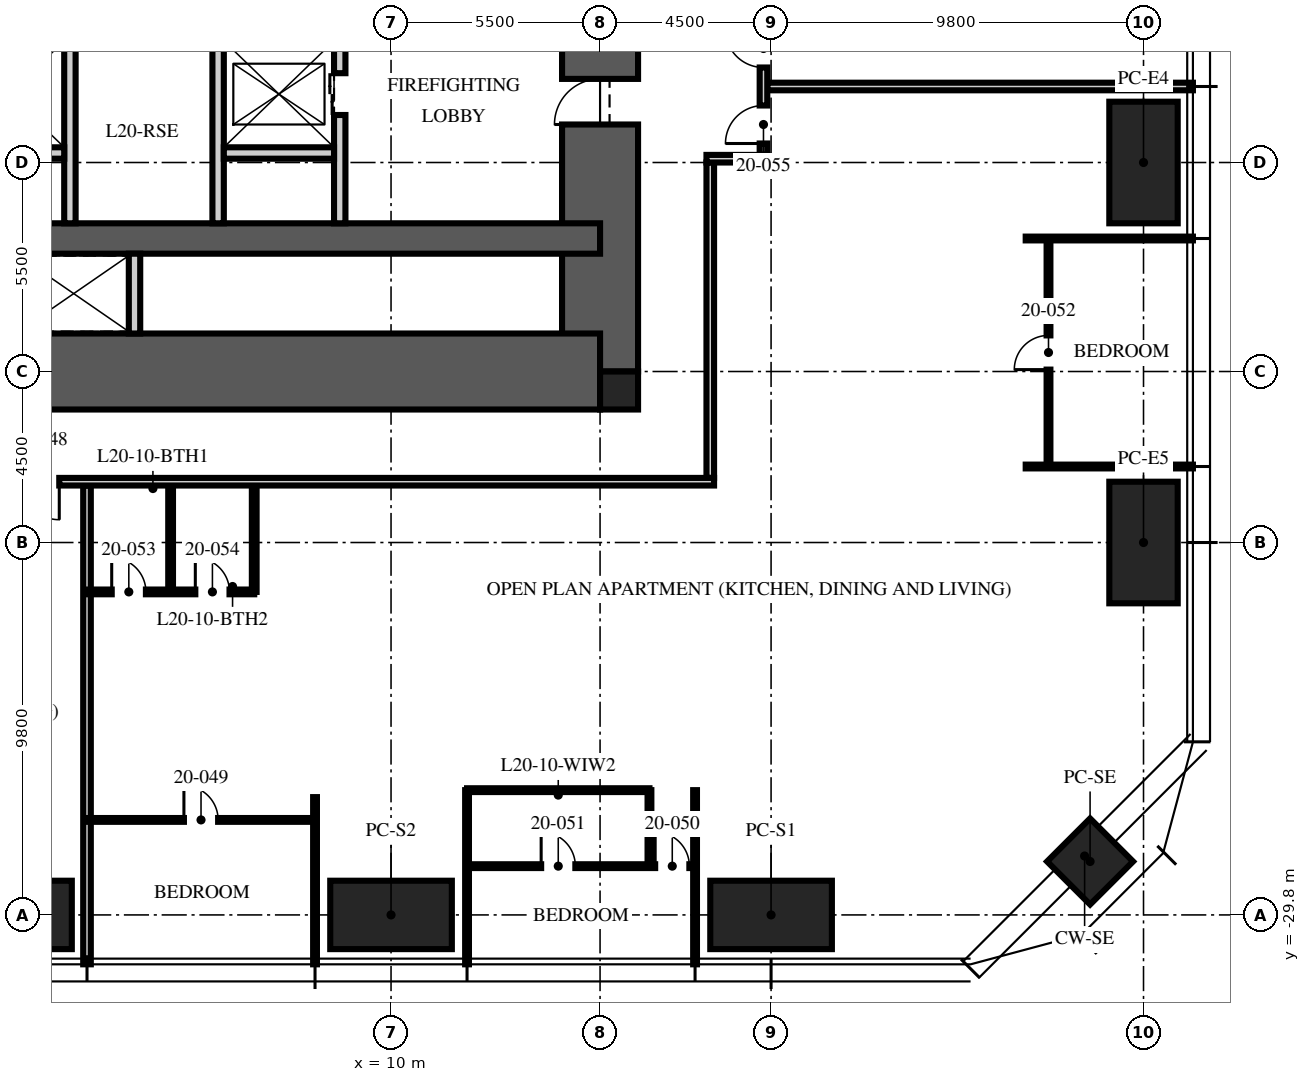
"""IFC4 building model, lengths in metres.
Left out: names, types, materials, properties, quantities, classifications, styles, units other than length and angle.
Written with IfcOpenShell. Run it as: python <this file> out.ifc"""

import sys

from ifc_helpers import new_model, si_unit, direction, frame, frame_2d, origin, origin_2d, place, context, subcontext, project, spatial, rectangle, hollow_rectangle, extrude, element, fill, save


model = new_model("IFC4")
c1 = context("Model", 3, precision=1e-05, world=origin(), true_north=direction((0.0, 1.0)))
c2 = subcontext(c1, "Body", "Model", "MODEL_VIEW")
j1 = project(units=[si_unit("LENGTHUNIT", "METRE"), si_unit("PLANEANGLEUNIT", "RADIAN")], contexts=[c1])
p1 = place(None, origin())
s1 = spatial("IfcSite", under=j1, at=p1, CompositionType="ELEMENT")
p2 = place(p1, origin())
s2 = spatial("IfcBuilding", under=s1, at=p2, CompositionType="ELEMENT")
p3 = place(p2, frame((0.0, 0.0, 81.0)))
s3 = spatial("IfcBuildingStorey", under=s2, at=p3, CompositionType="ELEMENT", Elevation=81.0)
p4 = place(p3, frame((15.5, -15.5, -0.25), z_axis=(0.0, 0.0, 1.0), x_axis=(0.0, 1.0, 0.0)))
e1 = element("IfcWall", 1, at=p4, inside=s3, PredefinedType="SHEAR", context=c2, shape_type="SweptSolid", body=[
    extrude(rectangle(XDim=31.0, YDim=2.0, at=frame_2d((15.5, 0.0))), origin(), (0.0, 0.0, 1.0), 3.75),
])
p5 = place(p4, frame((6.5, 0.0, 0.25)))
e2 = element("IfcOpeningElement", 2, at=p5, cuts=e1, PredefinedType="OPENING", context=c2, shape_type="SweptSolid", body=[
    extrude(rectangle(XDim=1.2, YDim=2.1, at=frame_2d((0.6, 1.05))), frame((0.0, 1.01, 0.0), z_axis=(0.0, -1.0, 0.0), x_axis=(1.0, 0.0, 0.0)), (0.0, 0.0, 1.0), 2.02),
])
p6 = place(p4, frame((23.0, 0.0, 0.25)))
e3 = element("IfcOpeningElement", 3, at=p6, cuts=e1, PredefinedType="OPENING", context=c2, shape_type="SweptSolid", body=[
    extrude(rectangle(XDim=1.8, YDim=2.1, at=frame_2d((0.9, 1.05))), frame((0.0, 1.01, 0.0), z_axis=(0.0, -1.0, 0.0), x_axis=(1.0, 0.0, 0.0)), (0.0, 0.0, 1.0), 2.02),
])
p7 = place(p3, frame((-15.5, -15.5, -0.25), z_axis=(0.0, 0.0, 1.0), x_axis=(1.0, 0.0, 0.0)))
e4 = element("IfcWall", 4, at=p7, inside=s3, PredefinedType="SHEAR", context=c2, shape_type="SweptSolid", body=[
    extrude(rectangle(XDim=31.0, YDim=2.0, at=frame_2d((15.5, 0.0))), origin(), (0.0, 0.0, 1.0), 3.75),
])
p8 = place(p3, frame((-15.5, -12.0, -0.25), z_axis=(0.0, 0.0, 1.0), x_axis=(1.0, 0.0, 0.0)))
e5 = element("IfcWall", 5, at=p8, inside=s3, PredefinedType="SHEAR", context=c2, shape_type="SweptSolid", body=[
    extrude(rectangle(XDim=31.0, YDim=0.8, at=frame_2d((15.5, 0.0))), origin(), (0.0, 0.0, 1.0), 3.75),
])
p9 = place(p3, frame((16.0, -16.0, -0.25), z_axis=(0.0, 0.0, 1.0), x_axis=(1.0, 0.0, 0.0)))
e6 = element("IfcColumn", 6, at=p9, inside=s3, PredefinedType="COLUMN", context=c2, shape_type="SweptSolid", body=[
    extrude(rectangle(XDim=1.0, YDim=1.0, at=origin_2d()), origin(), (0.0, 0.0, 1.0), 3.75),
])
for number, where, z_axis, x_axis in (
    (7, (29.8, -10.0, 0.0), (0.0, 0.0, 1.0), (0.0, 1.0, 0.0)),
    (8, (29.8, -20.0, 0.0), (0.0, 0.0, 1.0), (0.0, 1.0, 0.0)),
    (9, (20.0, -29.8, 0.0), (0.0, 0.0, 1.0), (1.0, 0.0, 0.0)),
    (10, (10.0, -29.8, 0.0), (0.0, 0.0, 1.0), (1.0, 0.0, 0.0)),
    (11, (0.0, -29.8, 0.0), (0.0, 0.0, 1.0), (1.0, 0.0, 0.0)),
):
    element("IfcColumn", number, at=place(p3, frame(where, z_axis=z_axis, x_axis=x_axis)), inside=s3, PredefinedType="COLUMN", context=c2, shape_type="SweptSolid", body=[
        extrude(hollow_rectangle(XDim=3.2, YDim=1.8, WallThickness=0.2, at=origin_2d()), origin(), (0.0, 0.0, 1.0), 3.75),
    ])
p10 = place(p3, frame((28.394, -28.394, 0.0), z_axis=(0.0, 0.0, 1.0), x_axis=(0.707106781187, 0.707106781187, 0.0)))
e12 = element("IfcColumn", 12, at=p10, inside=s3, PredefinedType="COLUMN", context=c2, shape_type="SweptSolid", body=[
    extrude(hollow_rectangle(XDim=1.6, YDim=1.6, WallThickness=0.1, at=origin_2d()), origin(), (0.0, 0.0, 1.0), 3.75),
])
p11 = place(p3, frame((8.65, -11.6, 0.0), z_axis=(0.0, 0.0, 1.0), x_axis=(0.0, 1.0, 0.0)))
e13 = element("IfcWall", 13, at=p11, inside=s3, PredefinedType="PARTITIONING", context=c2, shape_type="SweptSolid", body=[
    extrude(rectangle(XDim=6.7, YDim=0.3, at=frame_2d((3.35, 0.0))), origin(), (0.0, 0.0, 1.0), 3.5),
])
p12 = place(p11, frame((2.85, 0.0, 0.0)))
e14 = element("IfcOpeningElement", 14, at=p12, cuts=e13, PredefinedType="OPENING", context=c2, shape_type="SweptSolid", body=[
    extrude(rectangle(XDim=1.1, YDim=2.1, at=frame_2d((0.55, 1.05))), frame((0.0, 0.16, 0.0), z_axis=(0.0, -1.0, 0.0), x_axis=(1.0, 0.0, 0.0)), (0.0, 0.0, 1.0), 0.32),
])
for number, where, z_axis, x_axis in (
    (15, (1.55, -11.6, 0.0), (0.0, 0.0, 1.0), (0.0, 1.0, 0.0)),
    (16, (5.45, -11.6, 0.0), (0.0, 0.0, 1.0), (0.0, 1.0, 0.0)),
):
    element("IfcWall", number, at=place(p3, frame(where, z_axis=z_axis, x_axis=x_axis)), inside=s3, PredefinedType="PARTITIONING", context=c2, shape_type="SweptSolid", body=[
        extrude(rectangle(XDim=4.8, YDim=0.3, at=frame_2d((2.4, 0.0))), origin(), (0.0, 0.0, 1.0), 3.5),
    ])
for number, where, z_axis, x_axis in (
    (17, (-1.5, -9.75, 0.0), (0.0, 0.0, 1.0), (1.0, 0.0, 0.0)),
    (18, (5.6, -9.75, 0.0), (0.0, 0.0, 1.0), (1.0, 0.0, 0.0)),
):
    element("IfcWall", number, at=place(p3, frame(where, z_axis=z_axis, x_axis=x_axis)), inside=s3, PredefinedType="PARTITIONING", context=c2, shape_type="SweptSolid", body=[
        extrude(rectangle(XDim=2.9, YDim=0.3, at=frame_2d((1.45, 0.0))), origin(), (0.0, 0.0, 1.0), 3.5),
    ])
p13 = place(p3, frame((3.25, -14.5, 0.0), z_axis=(0.0, 0.0, 1.0), x_axis=(0.0, 1.0, 0.0)))
e19 = element("IfcWall", 19, at=p13, inside=s3, PredefinedType="PARTITIONING", context=c2, shape_type="SweptSolid", body=[
    extrude(rectangle(XDim=2.1, YDim=0.3, at=frame_2d((1.05, 0.0))), origin(), (0.0, 0.0, 1.0), 3.5),
])
p14 = place(p3, frame((19.9, -8.0, 0.0), z_axis=(0.0, 0.0, 1.0), x_axis=(1.0, 0.0, 0.0)))
e20 = element("IfcWall", 20, at=p14, inside=s3, PredefinedType="PARTITIONING", context=c2, shape_type="SweptSolid", body=[
    extrude(rectangle(XDim=11.2, YDim=0.2, at=frame_2d((5.6, 0.0))), origin(), (0.0, 0.0, 1.0), 2.71),
])
p15 = place(p3, frame((2.0, -18.5, 0.0), z_axis=(0.0, 0.0, 1.0), x_axis=(0.0, -1.0, 0.0)))
e21 = element("IfcWall", 21, at=p15, inside=s3, PredefinedType="PARTITIONING", context=c2, shape_type="SweptSolid", body=[
    extrude(rectangle(XDim=12.6, YDim=0.2, at=frame_2d((6.3, 0.0))), origin(), (0.0, 0.0, 1.0), 2.71),
])
p16 = place(p3, frame((8.0, -26.7, 0.0), z_axis=(0.0, 0.0, 1.0), x_axis=(0.0, -1.0, 0.0)))
e22 = element("IfcWall", 22, at=p16, inside=s3, PredefinedType="PARTITIONING", context=c2, shape_type="SweptSolid", body=[
    extrude(rectangle(XDim=4.4, YDim=0.1, at=frame_2d((2.2, 0.0))), origin(), (0.0, 0.0, 1.0), 2.71),
])
for number, where, z_axis, x_axis in (
    (23, (12.0, -26.517, 0.0), (0.0, 0.0, 1.0), (0.0, -1.0, 0.0)),
    (24, (18.0, -26.517, 0.0), (0.0, 0.0, 1.0), (0.0, -1.0, 0.0)),
):
    element("IfcWall", number, at=place(p3, frame(where, z_axis=z_axis, x_axis=x_axis)), inside=s3, PredefinedType="PARTITIONING", context=c2, shape_type="SweptSolid", body=[
        extrude(rectangle(XDim=4.583, YDim=0.1, at=frame_2d((2.292, 0.0))), origin(), (0.0, 0.0, 1.0), 2.71),
    ])
for number, where, z_axis, x_axis in (
    (25, (26.7, -18.0, 0.0), (0.0, 0.0, 1.0), (1.0, 0.0, 0.0)),
    (26, (26.7, -12.0, 0.0), (0.0, 0.0, 1.0), (1.0, 0.0, 0.0)),
):
    element("IfcWall", number, at=place(p3, frame(where, z_axis=z_axis, x_axis=x_axis)), inside=s3, PredefinedType="PARTITIONING", context=c2, shape_type="SweptSolid", body=[
        extrude(rectangle(XDim=4.4, YDim=0.1, at=frame_2d((2.2, 0.0))), origin(), (0.0, 0.0, 1.0), 2.71),
    ])
p17 = place(p3, frame((2.0, -27.3, 0.0), z_axis=(0.0, 0.0, 1.0), x_axis=(1.0, 0.0, 0.0)))
e27 = element("IfcWall", 27, at=p17, inside=s3, PredefinedType="PARTITIONING", context=c2, shape_type="SweptSolid", body=[
    extrude(rectangle(XDim=6.0, YDim=0.1, at=frame_2d((3.0, 0.0))), origin(), (0.0, 0.0, 1.0), 2.61),
])
p18 = place(p17, frame((2.55, 0.0, 0.0)))
e28 = element("IfcOpeningElement", 28, at=p18, cuts=e27, PredefinedType="OPENING", context=c2, shape_type="SweptSolid", body=[
    extrude(rectangle(XDim=0.9, YDim=2.1, at=frame_2d((0.45, 1.05))), frame((0.0, 0.06, 0.0), z_axis=(0.0, -1.0, 0.0), x_axis=(1.0, 0.0, 0.0)), (0.0, 0.0, 1.0), 0.12),
])
p19 = place(p3, frame((12.0, -28.517, 0.0), z_axis=(0.0, 0.0, 1.0), x_axis=(1.0, 0.0, 0.0)))
e29 = element("IfcWall", 29, at=p19, inside=s3, PredefinedType="PARTITIONING", context=c2, shape_type="SweptSolid", body=[
    extrude(rectangle(XDim=6.0, YDim=0.1, at=frame_2d((3.0, 0.0))), origin(), (0.0, 0.0, 1.0), 2.61),
])
p20 = place(p19, frame((4.95, 0.0, 0.0)))
e30 = element("IfcOpeningElement", 30, at=p20, cuts=e29, PredefinedType="OPENING", context=c2, shape_type="SweptSolid", body=[
    extrude(rectangle(XDim=0.9, YDim=2.1, at=frame_2d((0.45, 1.05))), frame((0.0, 0.06, 0.0), z_axis=(0.0, -1.0, 0.0), x_axis=(1.0, 0.0, 0.0)), (0.0, 0.0, 1.0), 0.12),
])
p21 = place(p19, frame((1.95, 0.0, 0.0)))
e31 = element("IfcOpeningElement", 31, at=p21, cuts=e29, PredefinedType="OPENING", context=c2, shape_type="SweptSolid", body=[
    extrude(rectangle(XDim=0.9, YDim=2.1, at=frame_2d((0.45, 1.05))), frame((0.0, 0.06, 0.0), z_axis=(0.0, -1.0, 0.0), x_axis=(1.0, 0.0, 0.0)), (0.0, 0.0, 1.0), 0.12),
])
p22 = place(p3, frame((16.8, -26.517, 0.0), z_axis=(0.0, 0.0, 1.0), x_axis=(0.0, -1.0, 0.0)))
e32 = element("IfcWall", 32, at=p22, inside=s3, PredefinedType="PARTITIONING", context=c2, shape_type="SweptSolid", body=[
    extrude(rectangle(XDim=2.0, YDim=0.1, at=frame_2d((1.0, 0.0))), origin(), (0.0, 0.0, 1.0), 3.5),
])
p23 = place(p3, frame((12.0, -26.517, 0.0), z_axis=(0.0, 0.0, 1.0), x_axis=(1.0, 0.0, 0.0)))
e33 = element("IfcWall", 33, at=p23, inside=s3, PredefinedType="PARTITIONING", context=c2, shape_type="SweptSolid", body=[
    extrude(rectangle(XDim=4.8, YDim=0.1, at=frame_2d((2.4, 0.0))), origin(), (0.0, 0.0, 1.0), 2.61),
])
p24 = place(p3, frame((27.3, -18.0, 0.0), z_axis=(0.0, 0.0, 1.0), x_axis=(0.0, 1.0, 0.0)))
e34 = element("IfcWall", 34, at=p24, inside=s3, PredefinedType="PARTITIONING", context=c2, shape_type="SweptSolid", body=[
    extrude(rectangle(XDim=6.0, YDim=0.1, at=frame_2d((3.0, 0.0))), origin(), (0.0, 0.0, 1.0), 2.61),
])
p25 = place(p24, frame((2.55, 0.0, 0.0)))
e35 = element("IfcOpeningElement", 35, at=p25, cuts=e34, PredefinedType="OPENING", context=c2, shape_type="SweptSolid", body=[
    extrude(rectangle(XDim=0.9, YDim=2.1, at=frame_2d((0.45, 1.05))), frame((0.0, 0.06, 0.0), z_axis=(0.0, -1.0, 0.0), x_axis=(1.0, 0.0, 0.0)), (0.0, 0.0, 1.0), 0.12),
])
p26 = place(p3, frame((2.0, -21.3, 0.0), z_axis=(0.0, 0.0, 1.0), x_axis=(1.0, 0.0, 0.0)))
e36 = element("IfcWall", 36, at=p26, inside=s3, PredefinedType="PARTITIONING", context=c2, shape_type="SweptSolid", body=[
    extrude(rectangle(XDim=4.4, YDim=0.125, at=frame_2d((2.2, 0.0))), origin(), (0.0, 0.0, 1.0), 2.61),
])
p27 = place(p26, frame((0.65, 0.0, 0.0)))
e37 = element("IfcOpeningElement", 37, at=p27, cuts=e36, PredefinedType="OPENING", context=c2, shape_type="SweptSolid", body=[
    extrude(rectangle(XDim=0.9, YDim=2.1, at=frame_2d((0.45, 1.05))), frame((0.0, 0.073, 0.0), z_axis=(0.0, -1.0, 0.0), x_axis=(1.0, 0.0, 0.0)), (0.0, 0.0, 1.0), 0.145),
])
p28 = place(p26, frame((2.85, 0.0, 0.0)))
e38 = element("IfcOpeningElement", 38, at=p28, cuts=e36, PredefinedType="OPENING", context=c2, shape_type="SweptSolid", body=[
    extrude(rectangle(XDim=0.9, YDim=2.1, at=frame_2d((0.45, 1.05))), frame((0.0, 0.073, 0.0), z_axis=(0.0, -1.0, 0.0), x_axis=(1.0, 0.0, 0.0)), (0.0, 0.0, 1.0), 0.145),
])
for number, where, z_axis, x_axis in (
    (39, (4.2, -18.5, 0.0), (0.0, 0.0, 1.0), (0.0, -1.0, 0.0)),
    (40, (6.4, -18.5, 0.0), (0.0, 0.0, 1.0), (0.0, -1.0, 0.0)),
):
    element("IfcWall", number, at=place(p3, frame(where, z_axis=z_axis, x_axis=x_axis)), inside=s3, PredefinedType="PARTITIONING", context=c2, shape_type="SweptSolid", body=[
        extrude(rectangle(XDim=2.8, YDim=0.125, at=frame_2d((1.4, 0.0))), origin(), (0.0, 0.0, 1.0), 3.5),
    ])
p29 = place(p3, frame((18.4, -18.3, 0.0), z_axis=(0.0, 0.0, 1.0), x_axis=(0.0, 1.0, 0.0)))
e41 = element("IfcWall", 41, at=p29, inside=s3, PredefinedType="PARTITIONING", context=c2, shape_type="SweptSolid", body=[
    extrude(rectangle(XDim=8.3, YDim=0.2, at=frame_2d((4.15, 0.0))), origin(), (0.0, 0.0, 1.0), 2.3),
])
p30 = place(p3, frame((18.3, -9.9, 0.0), z_axis=(0.0, 0.0, 1.0), x_axis=(1.0, 0.0, 0.0)))
e42 = element("IfcWall", 42, at=p30, inside=s3, PredefinedType="PARTITIONING", context=c2, shape_type="SweptSolid", body=[
    extrude(rectangle(XDim=1.6, YDim=0.2, at=frame_2d((0.8, 0.0))), origin(), (0.0, 0.0, 1.0), 2.492),
])
p31 = place(p3, frame((19.8, -9.8, 0.0), z_axis=(0.0, 0.0, 1.0), x_axis=(0.0, 1.0, 0.0)))
e43 = element("IfcWall", 43, at=p31, inside=s3, PredefinedType="PARTITIONING", context=c2, shape_type="SweptSolid", body=[
    extrude(rectangle(XDim=3.6, YDim=0.2, at=frame_2d((1.8, 0.0))), origin(), (0.0, 0.0, 1.0), 3.5),
])
p32 = place(p31, frame((2.3, 0.0, 0.0)))
e44 = element("IfcOpeningElement", 44, at=p32, cuts=e43, PredefinedType="OPENING", context=c2, shape_type="SweptSolid", body=[
    extrude(rectangle(XDim=1.0, YDim=2.2, at=frame_2d((0.5, 1.1))), frame((0.0, 0.11, 0.0), z_axis=(0.0, -1.0, 0.0), x_axis=(1.0, 0.0, 0.0)), (0.0, 0.0, 1.0), 0.22),
])
p33 = place(p31, frame((0.3, 0.0, 0.0)))
e45 = element("IfcOpeningElement", 45, at=p33, cuts=e43, PredefinedType="OPENING", context=c2, shape_type="SweptSolid", body=[
    extrude(rectangle(XDim=1.0, YDim=2.2, at=frame_2d((0.5, 1.1))), frame((0.0, 0.11, 0.0), z_axis=(0.0, -1.0, 0.0), x_axis=(1.0, 0.0, 0.0)), (0.0, 0.0, 1.0), 0.22),
])
p34 = place(p3, frame((18.5, -18.4, 0.0), z_axis=(0.0, 0.0, 1.0), x_axis=(-1.0, 0.0, 0.0)))
e46 = element("IfcWall", 46, at=p34, inside=s3, PredefinedType="PARTITIONING", context=c2, shape_type="SweptSolid", body=[
    extrude(rectangle(XDim=37.0, YDim=0.2, at=frame_2d((18.5, 0.0))), origin(), (0.0, 0.0, 1.0), 2.3),
])
p35 = place(p34, frame((27.1, 0.0, 0.0)))
e47 = element("IfcOpeningElement", 47, at=p35, cuts=e46, PredefinedType="OPENING", context=c2, shape_type="SweptSolid", body=[
    extrude(rectangle(XDim=1.0, YDim=2.2, at=frame_2d((0.5, 1.1))), frame((0.0, 0.11, 0.0), z_axis=(0.0, -1.0, 0.0), x_axis=(1.0, 0.0, 0.0)), (0.0, 0.0, 1.0), 0.22),
])
p36 = place(p34, frame((17.23, 0.0, 0.0)))
e48 = element("IfcOpeningElement", 48, at=p36, cuts=e46, PredefinedType="OPENING", context=c2, shape_type="SweptSolid", body=[
    extrude(rectangle(XDim=1.0, YDim=2.2, at=frame_2d((0.5, 1.1))), frame((0.0, 0.11, 0.0), z_axis=(0.0, -1.0, 0.0), x_axis=(1.0, 0.0, 0.0)), (0.0, 0.0, 1.0), 0.22),
])
p37 = place(p5, origin())
e49 = element("IfcDoor", 49, at=p37, inside=s3, OperationType="SINGLE_SWING_LEFT", PredefinedType="DOOR", context=c2, shape_type="SweptSolid", body=[
    extrude(rectangle(XDim=1.2, YDim=2.1, at=frame_2d((0.6, 1.05))), frame((0.0, 0.025, 0.0), z_axis=(0.0, -1.0, 0.0), x_axis=(1.0, 0.0, 0.0)), (0.0, 0.0, 1.0), 0.05),
])
fill(e2, e49)
p38 = place(p12, origin())
e50 = element("IfcDoor", 50, at=p38, inside=s3, OperationType="DOUBLE_DOOR_SLIDING", PredefinedType="DOOR", context=c2, shape_type="SweptSolid", body=[
    extrude(rectangle(XDim=1.1, YDim=2.1, at=frame_2d((0.55, 1.05))), frame((0.0, 0.025, 0.0), z_axis=(0.0, -1.0, 0.0), x_axis=(1.0, 0.0, 0.0)), (0.0, 0.0, 1.0), 0.05),
])
fill(e14, e50)
p39 = place(p32, origin())
e51 = element("IfcDoor", 51, at=p39, inside=s3, OperationType="SINGLE_SWING_RIGHT", PredefinedType="DOOR", context=c2, shape_type="SweptSolid", body=[
    extrude(rectangle(XDim=1.0, YDim=2.2, at=frame_2d((0.5, 1.1))), frame((0.0, 0.025, 0.0), z_axis=(0.0, -1.0, 0.0), x_axis=(1.0, 0.0, 0.0)), (0.0, 0.0, 1.0), 0.05),
])
fill(e44, e51)
p40 = place(p36, origin())
e52 = element("IfcDoor", 52, at=p40, inside=s3, OperationType="SINGLE_SWING_LEFT", PredefinedType="DOOR", context=c2, shape_type="SweptSolid", body=[
    extrude(rectangle(XDim=1.0, YDim=2.2, at=frame_2d((0.5, 1.1))), frame((0.0, 0.025, 0.0), z_axis=(0.0, -1.0, 0.0), x_axis=(1.0, 0.0, 0.0)), (0.0, 0.0, 1.0), 0.05),
])
fill(e48, e52)
p41 = place(p18, origin())
e53 = element("IfcDoor", 53, at=p41, inside=s3, OperationType="SINGLE_SWING_LEFT", PredefinedType="DOOR", context=c2, shape_type="SweptSolid", body=[
    extrude(rectangle(XDim=0.9, YDim=2.1, at=frame_2d((0.45, 1.05))), frame((0.0, 0.025, 0.0), z_axis=(0.0, -1.0, 0.0), x_axis=(1.0, 0.0, 0.0)), (0.0, 0.0, 1.0), 0.05),
])
fill(e28, e53)
p42 = place(p20, origin())
e54 = element("IfcDoor", 54, at=p42, inside=s3, OperationType="SINGLE_SWING_LEFT", PredefinedType="DOOR", context=c2, shape_type="SweptSolid", body=[
    extrude(rectangle(XDim=0.9, YDim=2.1, at=frame_2d((0.45, 1.05))), frame((0.0, 0.025, 0.0), z_axis=(0.0, -1.0, 0.0), x_axis=(1.0, 0.0, 0.0)), (0.0, 0.0, 1.0), 0.05),
])
fill(e30, e54)
p43 = place(p21, origin())
e55 = element("IfcDoor", 55, at=p43, inside=s3, OperationType="SINGLE_SWING_LEFT", PredefinedType="DOOR", context=c2, shape_type="SweptSolid", body=[
    extrude(rectangle(XDim=0.9, YDim=2.1, at=frame_2d((0.45, 1.05))), frame((0.0, 0.025, 0.0), z_axis=(0.0, -1.0, 0.0), x_axis=(1.0, 0.0, 0.0)), (0.0, 0.0, 1.0), 0.05),
])
fill(e31, e55)
p44 = place(p25, origin())
e56 = element("IfcDoor", 56, at=p44, inside=s3, OperationType="SINGLE_SWING_LEFT", PredefinedType="DOOR", context=c2, shape_type="SweptSolid", body=[
    extrude(rectangle(XDim=0.9, YDim=2.1, at=frame_2d((0.45, 1.05))), frame((0.0, 0.025, 0.0), z_axis=(0.0, -1.0, 0.0), x_axis=(1.0, 0.0, 0.0)), (0.0, 0.0, 1.0), 0.05),
])
fill(e35, e56)
p45 = place(p27, origin())
e57 = element("IfcDoor", 57, at=p45, inside=s3, OperationType="SINGLE_SWING_LEFT", PredefinedType="DOOR", context=c2, shape_type="SweptSolid", body=[
    extrude(rectangle(XDim=0.9, YDim=2.1, at=frame_2d((0.45, 1.05))), frame((0.0, 0.025, 0.0), z_axis=(0.0, -1.0, 0.0), x_axis=(1.0, 0.0, 0.0)), (0.0, 0.0, 1.0), 0.05),
])
fill(e37, e57)
p46 = place(p28, origin())
e58 = element("IfcDoor", 58, at=p46, inside=s3, OperationType="SINGLE_SWING_LEFT", PredefinedType="DOOR", context=c2, shape_type="SweptSolid", body=[
    extrude(rectangle(XDim=0.9, YDim=2.1, at=frame_2d((0.45, 1.05))), frame((0.0, 0.025, 0.0), z_axis=(0.0, -1.0, 0.0), x_axis=(1.0, 0.0, 0.0)), (0.0, 0.0, 1.0), 0.05),
])
fill(e38, e58)
p47 = place(p33, origin())
e59 = element("IfcDoor", 59, at=p47, inside=s3, OperationType="SINGLE_SWING_LEFT", PredefinedType="DOOR", context=c2, shape_type="SweptSolid", body=[
    extrude(rectangle(XDim=1.0, YDim=2.2, at=frame_2d((0.5, 1.1))), frame((0.0, 0.025, 0.0), z_axis=(0.0, -1.0, 0.0), x_axis=(1.0, 0.0, 0.0)), (0.0, 0.0, 1.0), 0.05),
])
fill(e45, e59)
save(model, sys.argv[1])
